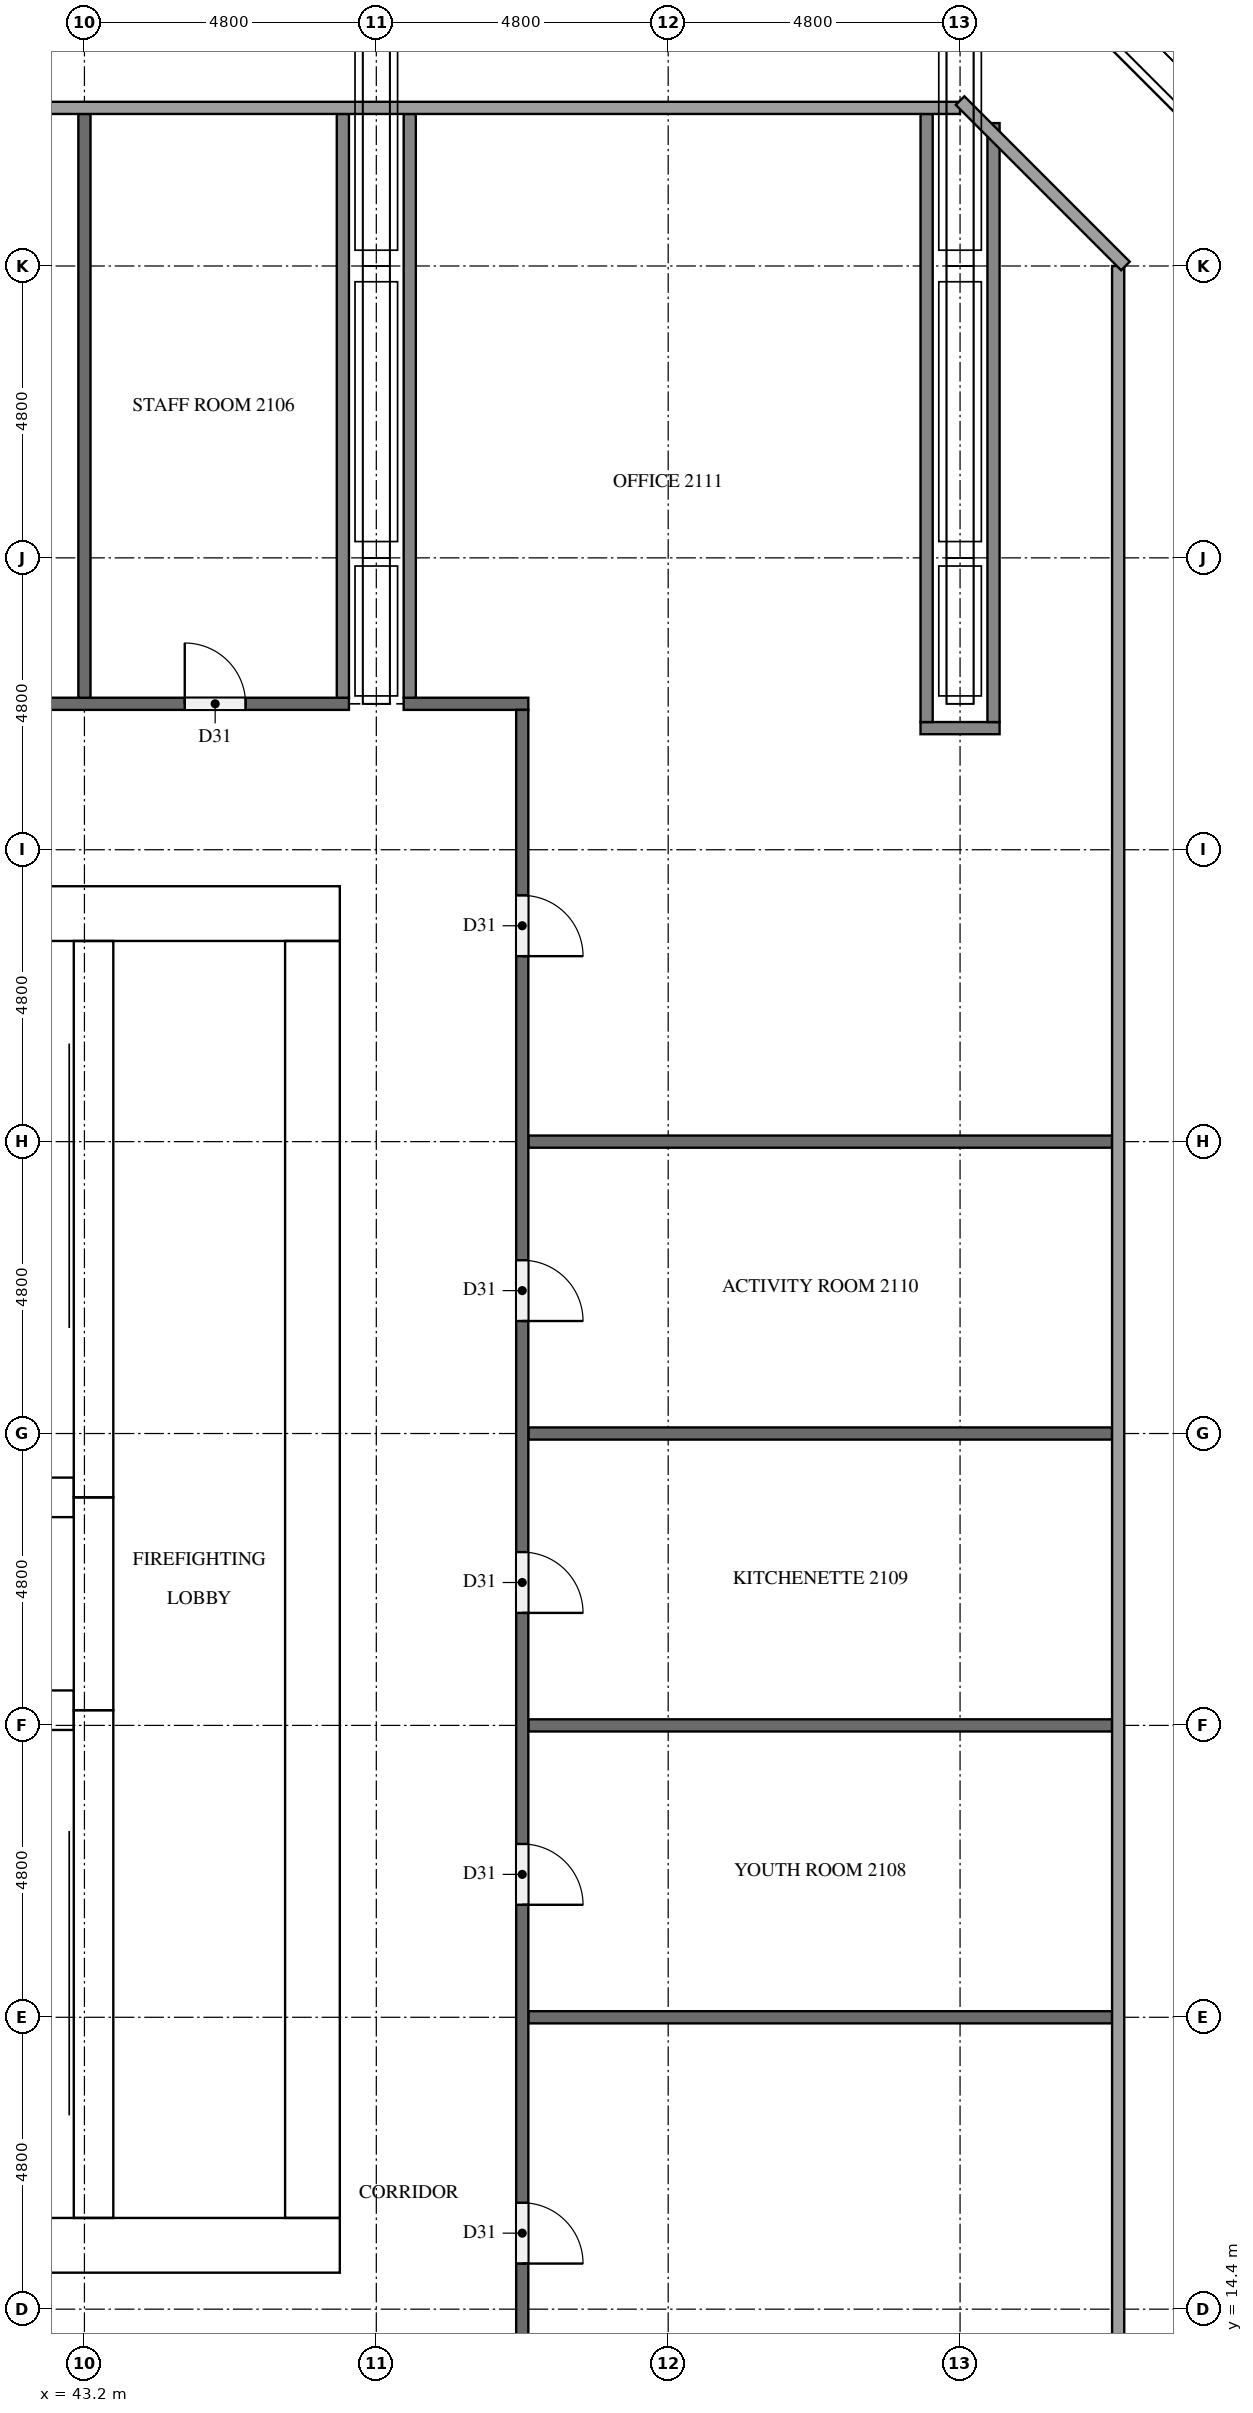
"""IFC4 building model, lengths in metres.
Left out: names, types, materials, properties, quantities, classifications, styles, units other than length and angle.
Written with IfcOpenShell. Run it as: python <this file> out.ifc"""

import sys

from ifc_helpers import new_model, si_unit, direction, frame, frame_2d, origin, place, context, subcontext, project, spatial, rectangle, extrude, element, fill, save


model = new_model("IFC4")
c1 = context("Model", 3, precision=1e-05, world=origin(), true_north=direction((0.0, 1.0)))
c2 = subcontext(c1, "Body", "Model", "MODEL_VIEW")
j1 = project(units=[si_unit("LENGTHUNIT", "METRE"), si_unit("PLANEANGLEUNIT", "RADIAN")], contexts=[c1])
p1 = place(None, origin())
s1 = spatial("IfcSite", under=j1, at=p1, CompositionType="ELEMENT")
p2 = place(p1, origin())
s2 = spatial("IfcBuilding", under=s1, at=p2, CompositionType="ELEMENT")
p3 = place(p2, frame((0.0, 0.0, 83.8)))
s3 = spatial("IfcBuildingStorey", under=s2, at=p3, CompositionType="ELEMENT", Elevation=83.8)
p4 = place(p3, frame((15.0, 15.45, 0.0), z_axis=(0.0, 0.0, 1.0), x_axis=(1.0, 0.0, 0.0)))
e1 = element("IfcWall", 1, at=p4, inside=s3, PredefinedType="SHEAR", context=c2, shape_type="SweptSolid", body=[
    extrude(rectangle(XDim=32.4, YDim=0.9, at=frame_2d((16.2, 0.0))), origin(), (0.0, 0.0, 1.0), 5.1),
])
p5 = place(p4, frame((15.3, 0.0, 0.0)))
e2 = element("IfcOpeningElement", 2, at=p5, cuts=e1, PredefinedType="OPENING", context=c2, shape_type="SweptSolid", body=[
    extrude(rectangle(XDim=1.8, YDim=2.1, at=frame_2d((0.9, 1.05))), frame((0.0, 0.46, 0.0), z_axis=(0.0, -1.0, 0.0), x_axis=(1.0, 0.0, 0.0)), (0.0, 0.0, 1.0), 0.92),
])
p6 = place(p3, frame((15.0, 37.35, 0.0), z_axis=(0.0, 0.0, 1.0), x_axis=(1.0, 0.0, 0.0)))
e3 = element("IfcWall", 3, at=p6, inside=s3, PredefinedType="SHEAR", context=c2, shape_type="SweptSolid", body=[
    extrude(rectangle(XDim=32.4, YDim=0.9, at=frame_2d((16.2, 0.0))), origin(), (0.0, 0.0, 1.0), 5.1),
])
p7 = place(p6, frame((15.3, 0.0, 0.0)))
e4 = element("IfcOpeningElement", 4, at=p7, cuts=e3, PredefinedType="OPENING", context=c2, shape_type="SweptSolid", body=[
    extrude(rectangle(XDim=1.8, YDim=2.1, at=frame_2d((0.9, 1.05))), frame((0.0, 0.46, 0.0), z_axis=(0.0, -1.0, 0.0), x_axis=(1.0, 0.0, 0.0)), (0.0, 0.0, 1.0), 0.92),
])
p8 = place(p6, frame((1.794, 0.0, 0.0)))
e5 = element("IfcOpeningElement", 5, at=p8, cuts=e3, PredefinedType="OPENING", context=c2, shape_type="SweptSolid", body=[
    extrude(rectangle(XDim=1.0, YDim=2.1, at=frame_2d((0.5, 1.05))), frame((0.0, 0.46, 0.0), z_axis=(0.0, -1.0, 0.0), x_axis=(1.0, 0.0, 0.0)), (0.0, 0.0, 1.0), 0.92),
])
p9 = place(p6, frame((5.331, 0.0, 0.0)))
e6 = element("IfcOpeningElement", 6, at=p9, cuts=e3, PredefinedType="OPENING", context=c2, shape_type="SweptSolid", body=[
    extrude(rectangle(XDim=1.0, YDim=2.1, at=frame_2d((0.5, 1.05))), frame((0.0, 0.46, 0.0), z_axis=(0.0, -1.0, 0.0), x_axis=(1.0, 0.0, 0.0)), (0.0, 0.0, 1.0), 0.92),
])
p10 = place(p3, frame((46.95, 15.9, 0.0), z_axis=(0.0, 0.0, 1.0), x_axis=(0.0, 1.0, 0.0)))
e7 = element("IfcWall", 7, at=p10, inside=s3, PredefinedType="SHEAR", context=c2, shape_type="SweptSolid", body=[
    extrude(rectangle(XDim=21.0, YDim=0.9, at=frame_2d((10.5, 0.0))), origin(), (0.0, 0.0, 1.0), 5.1),
])
p11 = place(p10, frame((10.2, 0.0, 0.0)))
e8 = element("IfcOpeningElement", 8, at=p11, cuts=e7, PredefinedType="OPENING", context=c2, shape_type="SweptSolid", body=[
    extrude(rectangle(XDim=1.2, YDim=2.1, at=frame_2d((0.6, 1.05))), frame((0.0, 0.46, 0.0), z_axis=(0.0, -1.0, 0.0), x_axis=(1.0, 0.0, 0.0)), (0.0, 0.0, 1.0), 0.92),
])
p12 = place(p3, frame((43.35, 15.9, 0.0), z_axis=(0.0, 0.0, 1.0), x_axis=(0.0, 1.0, 0.0)))
e9 = element("IfcWall", 9, at=p12, inside=s3, PredefinedType="SHEAR", context=c2, shape_type="SweptSolid", body=[
    extrude(rectangle(XDim=8.35, YDim=0.65, at=frame_2d((4.175, 0.0))), origin(), (0.0, 0.0, 1.0), 5.1),
])
p13 = place(p12, frame((0.3, 0.0, 0.0)))
e10 = element("IfcOpeningElement", 10, at=p13, cuts=e9, PredefinedType="OPENING", context=c2, shape_type="SweptSolid", body=[
    extrude(rectangle(XDim=1.2, YDim=2.1, at=frame_2d((0.6, 1.05))), frame((0.0, 0.335, 0.0), z_axis=(0.0, -1.0, 0.0), x_axis=(1.0, 0.0, 0.0)), (0.0, 0.0, 1.0), 0.67),
])
p14 = place(p3, frame((43.35, 24.25, 0.0), z_axis=(0.0, 0.0, 1.0), x_axis=(0.0, 1.0, 0.0)))
e11 = element("IfcWall", 11, at=p14, inside=s3, PredefinedType="SHEAR", context=c2, shape_type="SweptSolid", body=[
    extrude(rectangle(XDim=3.5, YDim=0.65, at=frame_2d((1.75, 0.0))), origin(), (0.0, 0.0, 1.0), 5.1),
])
p15 = place(p14, frame((1.2, 0.0, 0.0)))
e12 = element("IfcOpeningElement", 12, at=p15, cuts=e11, PredefinedType="OPENING", context=c2, shape_type="SweptSolid", body=[
    extrude(rectangle(XDim=1.1, YDim=2.1, at=frame_2d((0.55, 1.05))), frame((0.0, 0.335, 0.0), z_axis=(0.0, -1.0, 0.0), x_axis=(1.0, 0.0, 0.0)), (0.0, 0.0, 1.0), 0.67),
])
p16 = place(p3, frame((43.35, 27.75, 0.0), z_axis=(0.0, 0.0, 1.0), x_axis=(0.0, 1.0, 0.0)))
e13 = element("IfcWall", 13, at=p16, inside=s3, PredefinedType="SHEAR", context=c2, shape_type="SweptSolid", body=[
    extrude(rectangle(XDim=9.15, YDim=0.65, at=frame_2d((4.575, 0.0))), origin(), (0.0, 0.0, 1.0), 5.1),
])
p17 = place(p16, frame((7.65, 0.0, 0.0)))
e14 = element("IfcOpeningElement", 14, at=p17, cuts=e13, PredefinedType="OPENING", context=c2, shape_type="SweptSolid", body=[
    extrude(rectangle(XDim=1.2, YDim=2.1, at=frame_2d((0.6, 1.05))), frame((0.0, 0.335, 0.0), z_axis=(0.0, -1.0, 0.0), x_axis=(1.0, 0.0, 0.0)), (0.0, 0.0, 1.0), 0.67),
])
for number, where, z_axis, x_axis in (
    (15, (39.625, 24.25, 0.0), (0.0, 0.0, 1.0), (1.0, 0.0, 0.0)),
    (16, (39.625, 27.75, 0.0), (0.0, 0.0, 1.0), (1.0, 0.0, 0.0)),
):
    element("IfcWall", number, at=place(p3, frame(where, z_axis=z_axis, x_axis=x_axis)), inside=s3, PredefinedType="SHEAR", context=c2, shape_type="SweptSolid", body=[
        extrude(rectangle(XDim=3.4, YDim=0.65, at=frame_2d((1.7, 0.0))), origin(), (0.0, 0.0, 1.0), 5.1),
    ])
for number, where, z_axis, x_axis in (
    (17, (50.5, 19.2, 0.0), (0.0, 0.0, 1.0), (1.0, 0.0, 0.0)),
    (18, (50.5, 24.0, 0.0), (0.0, 0.0, 1.0), (1.0, 0.0, 0.0)),
    (19, (50.5, 28.8, 0.0), (0.0, 0.0, 1.0), (1.0, 0.0, 0.0)),
    (20, (50.5, 33.6, 0.0), (0.0, 0.0, 1.0), (1.0, 0.0, 0.0)),
):
    element("IfcWall", number, at=place(p3, frame(where, z_axis=z_axis, x_axis=x_axis)), inside=s3, PredefinedType="PARTITIONING", context=c2, shape_type="SweptSolid", body=[
        extrude(rectangle(XDim=9.6, YDim=0.2, at=frame_2d((4.8, 0.0))), origin(), (0.0, 0.0, 1.0), 5.1),
    ])
p18 = place(p3, frame((56.95, 40.4, 0.0), z_axis=(0.0, 0.0, 1.0), x_axis=(1.0, 0.0, 0.0)))
e21 = element("IfcWall", 21, at=p18, inside=s3, PredefinedType="PARTITIONING", context=c2, shape_type="SweptSolid", body=[
    extrude(rectangle(XDim=1.3, YDim=0.2, at=frame_2d((0.65, 0.0))), origin(), (0.0, 0.0, 1.0), 5.1),
])
p19 = place(p3, frame((38.85, 40.8, 0.0), z_axis=(0.0, 0.0, 1.0), x_axis=(1.0, 0.0, 0.0)))
e22 = element("IfcWall", 22, at=p19, inside=s3, PredefinedType="PARTITIONING", context=c2, shape_type="SweptSolid", body=[
    extrude(rectangle(XDim=8.7, YDim=0.2, at=frame_2d((4.35, 0.0))), origin(), (0.0, 0.0, 1.0), 5.1),
])
p20 = place(p19, frame((1.65, 0.0, 0.0)))
e23 = element("IfcOpeningElement", 23, at=p20, cuts=e22, PredefinedType="OPENING", context=c2, shape_type="SweptSolid", body=[
    extrude(rectangle(XDim=1.0, YDim=2.1, at=frame_2d((0.5, 1.05))), frame((0.0, 0.11, 0.0), z_axis=(0.0, -1.0, 0.0), x_axis=(1.0, 0.0, 0.0)), (0.0, 0.0, 1.0), 0.22),
])
p21 = place(p19, frame((6.0, 0.0, 0.0)))
e24 = element("IfcOpeningElement", 24, at=p21, cuts=e22, PredefinedType="OPENING", context=c2, shape_type="SweptSolid", body=[
    extrude(rectangle(XDim=1.0, YDim=2.1, at=frame_2d((0.5, 1.05))), frame((0.0, 0.11, 0.0), z_axis=(0.0, -1.0, 0.0), x_axis=(1.0, 0.0, 0.0)), (0.0, 0.0, 1.0), 0.22),
])
p22 = place(p3, frame((48.45, 40.8, 0.0), z_axis=(0.0, 0.0, 1.0), x_axis=(1.0, 0.0, 0.0)))
e25 = element("IfcWall", 25, at=p22, inside=s3, PredefinedType="PARTITIONING", context=c2, shape_type="SweptSolid", body=[
    extrude(rectangle(XDim=2.05, YDim=0.2, at=frame_2d((1.025, 0.0))), origin(), (0.0, 0.0, 1.0), 5.1),
])
for number, where, z_axis, x_axis in (
    (26, (43.2, 40.9, 0.0), (0.0, 0.0, 1.0), (0.0, 1.0, 0.0)),
    (27, (47.45, 40.9, 0.0), (0.0, 0.0, 1.0), (0.0, 1.0, 0.0)),
    (28, (48.55, 40.9, 0.0), (0.0, 0.0, 1.0), (0.0, 1.0, 0.0)),
):
    element("IfcWall", number, at=place(p3, frame(where, z_axis=z_axis, x_axis=x_axis)), inside=s3, PredefinedType="PARTITIONING", context=c2, shape_type="SweptSolid", body=[
        extrude(rectangle(XDim=9.6, YDim=0.2, at=frame_2d((4.8, 0.0))), origin(), (0.0, 0.0, 1.0), 5.1),
    ])
p23 = place(p3, frame((50.4, 40.7, 0.0), z_axis=(0.0, 0.0, 1.0), x_axis=(0.0, -1.0, 0.0)))
e29 = element("IfcWall", 29, at=p23, inside=s3, PredefinedType="PARTITIONING", context=c2, shape_type="SweptSolid", body=[
    extrude(rectangle(XDim=28.6, YDim=0.2, at=frame_2d((14.3, 0.0))), origin(), (0.0, 0.0, 1.0), 5.1),
])
p24 = place(p23, frame((24.55, 0.0, 0.0)))
e30 = element("IfcOpeningElement", 30, at=p24, cuts=e29, PredefinedType="OPENING", context=c2, shape_type="SweptSolid", body=[
    extrude(rectangle(XDim=1.0, YDim=2.1, at=frame_2d((0.5, 1.05))), frame((0.0, 0.11, 0.0), z_axis=(0.0, -1.0, 0.0), x_axis=(1.0, 0.0, 0.0)), (0.0, 0.0, 1.0), 0.22),
])
p25 = place(p23, frame((18.65, 0.0, 0.0)))
e31 = element("IfcOpeningElement", 31, at=p25, cuts=e29, PredefinedType="OPENING", context=c2, shape_type="SweptSolid", body=[
    extrude(rectangle(XDim=1.0, YDim=2.1, at=frame_2d((0.5, 1.05))), frame((0.0, 0.11, 0.0), z_axis=(0.0, -1.0, 0.0), x_axis=(1.0, 0.0, 0.0)), (0.0, 0.0, 1.0), 0.22),
])
p26 = place(p23, frame((13.85, 0.0, 0.0)))
e32 = element("IfcOpeningElement", 32, at=p26, cuts=e29, PredefinedType="OPENING", context=c2, shape_type="SweptSolid", body=[
    extrude(rectangle(XDim=1.0, YDim=2.1, at=frame_2d((0.5, 1.05))), frame((0.0, 0.11, 0.0), z_axis=(0.0, -1.0, 0.0), x_axis=(1.0, 0.0, 0.0)), (0.0, 0.0, 1.0), 0.22),
])
p27 = place(p23, frame((9.05, 0.0, 0.0)))
e33 = element("IfcOpeningElement", 33, at=p27, cuts=e29, PredefinedType="OPENING", context=c2, shape_type="SweptSolid", body=[
    extrude(rectangle(XDim=1.0, YDim=2.1, at=frame_2d((0.5, 1.05))), frame((0.0, 0.11, 0.0), z_axis=(0.0, -1.0, 0.0), x_axis=(1.0, 0.0, 0.0)), (0.0, 0.0, 1.0), 0.22),
])
p28 = place(p23, frame((3.05, 0.0, 0.0)))
e34 = element("IfcOpeningElement", 34, at=p28, cuts=e29, PredefinedType="OPENING", context=c2, shape_type="SweptSolid", body=[
    extrude(rectangle(XDim=1.0, YDim=2.1, at=frame_2d((0.5, 1.05))), frame((0.0, 0.11, 0.0), z_axis=(0.0, -1.0, 0.0), x_axis=(1.0, 0.0, 0.0)), (0.0, 0.0, 1.0), 0.22),
])
p29 = place(p3, frame((57.05, 40.5, 0.0), z_axis=(0.0, 0.0, 1.0), x_axis=(0.0, 1.0, 0.0)))
e35 = element("IfcWall", 35, at=p29, inside=s3, PredefinedType="PARTITIONING", context=c2, shape_type="SweptSolid", body=[
    extrude(rectangle(XDim=10.0, YDim=0.2, at=frame_2d((5.0, 0.0))), origin(), (0.0, 0.0, 1.0), 5.1),
])
p30 = place(p3, frame((58.15, 40.5, 0.0), z_axis=(0.0, 0.0, 1.0), x_axis=(0.0, 1.0, 0.0)))
e36 = element("IfcWall", 36, at=p30, inside=s3, PredefinedType="PARTITIONING", context=c2, shape_type="SweptSolid", body=[
    extrude(rectangle(XDim=9.85, YDim=0.2, at=frame_2d((4.925, 0.0))), origin(), (0.0, 0.0, 1.0), 5.1),
])
p31 = place(p15, origin())
e37 = element("IfcDoor", 37, at=p31, inside=s3, OperationType="DOUBLE_DOOR_SLIDING", PredefinedType="DOOR", context=c2, shape_type="SweptSolid", body=[
    extrude(rectangle(XDim=1.1, YDim=2.1, at=frame_2d((0.55, 1.05))), frame((0.0, 0.025, 0.0), z_axis=(0.0, -1.0, 0.0), x_axis=(1.0, 0.0, 0.0)), (0.0, 0.0, 1.0), 0.05),
])
fill(e12, e37)
p32 = place(p13, origin())
e38 = element("IfcDoor", 38, at=p32, inside=s3, OperationType="SINGLE_SWING_RIGHT", PredefinedType="DOOR", context=c2, shape_type="SweptSolid", body=[
    extrude(rectangle(XDim=1.2, YDim=2.1, at=frame_2d((0.6, 1.05))), frame((0.0, 0.025, 0.0), z_axis=(0.0, -1.0, 0.0), x_axis=(1.0, 0.0, 0.0)), (0.0, 0.0, 1.0), 0.05),
])
fill(e10, e38)
p33 = place(p17, origin())
e39 = element("IfcDoor", 39, at=p33, inside=s3, OperationType="SINGLE_SWING_LEFT", PredefinedType="DOOR", context=c2, shape_type="SweptSolid", body=[
    extrude(rectangle(XDim=1.2, YDim=2.1, at=frame_2d((0.6, 1.05))), frame((0.0, 0.025, 0.0), z_axis=(0.0, -1.0, 0.0), x_axis=(1.0, 0.0, 0.0)), (0.0, 0.0, 1.0), 0.05),
])
fill(e14, e39)
p34 = place(p11, origin())
e40 = element("IfcDoor", 40, at=p34, inside=s3, OperationType="SINGLE_SWING_LEFT", PredefinedType="DOOR", context=c2, shape_type="SweptSolid", body=[
    extrude(rectangle(XDim=1.2, YDim=2.1, at=frame_2d((0.6, 1.05))), frame((0.0, 0.025, 0.0), z_axis=(0.0, -1.0, 0.0), x_axis=(1.0, 0.0, 0.0)), (0.0, 0.0, 1.0), 0.05),
])
fill(e8, e40)
p35 = place(p21, origin())
e41 = element("IfcDoor", 41, at=p35, inside=s3, OperationType="SINGLE_SWING_LEFT", PredefinedType="DOOR", context=c2, shape_type="SweptSolid", body=[
    extrude(rectangle(XDim=1.0, YDim=2.1, at=frame_2d((0.5, 1.05))), frame((0.0, 0.025, 0.0), z_axis=(0.0, -1.0, 0.0), x_axis=(1.0, 0.0, 0.0)), (0.0, 0.0, 1.0), 0.05),
])
fill(e24, e41)
p36 = place(p24, origin())
e42 = element("IfcDoor", 42, at=p36, inside=s3, OperationType="SINGLE_SWING_RIGHT", PredefinedType="DOOR", context=c2, shape_type="SweptSolid", body=[
    extrude(rectangle(XDim=1.0, YDim=2.1, at=frame_2d((0.5, 1.05))), frame((0.0, 0.025, 0.0), z_axis=(0.0, -1.0, 0.0), x_axis=(1.0, 0.0, 0.0)), (0.0, 0.0, 1.0), 0.05),
])
fill(e30, e42)
p37 = place(p25, origin())
e43 = element("IfcDoor", 43, at=p37, inside=s3, OperationType="SINGLE_SWING_RIGHT", PredefinedType="DOOR", context=c2, shape_type="SweptSolid", body=[
    extrude(rectangle(XDim=1.0, YDim=2.1, at=frame_2d((0.5, 1.05))), frame((0.0, 0.025, 0.0), z_axis=(0.0, -1.0, 0.0), x_axis=(1.0, 0.0, 0.0)), (0.0, 0.0, 1.0), 0.05),
])
fill(e31, e43)
p38 = place(p26, origin())
e44 = element("IfcDoor", 44, at=p38, inside=s3, OperationType="SINGLE_SWING_RIGHT", PredefinedType="DOOR", context=c2, shape_type="SweptSolid", body=[
    extrude(rectangle(XDim=1.0, YDim=2.1, at=frame_2d((0.5, 1.05))), frame((0.0, 0.025, 0.0), z_axis=(0.0, -1.0, 0.0), x_axis=(1.0, 0.0, 0.0)), (0.0, 0.0, 1.0), 0.05),
])
fill(e32, e44)
p39 = place(p27, origin())
e45 = element("IfcDoor", 45, at=p39, inside=s3, OperationType="SINGLE_SWING_RIGHT", PredefinedType="DOOR", context=c2, shape_type="SweptSolid", body=[
    extrude(rectangle(XDim=1.0, YDim=2.1, at=frame_2d((0.5, 1.05))), frame((0.0, 0.025, 0.0), z_axis=(0.0, -1.0, 0.0), x_axis=(1.0, 0.0, 0.0)), (0.0, 0.0, 1.0), 0.05),
])
fill(e33, e45)
p40 = place(p28, origin())
e46 = element("IfcDoor", 46, at=p40, inside=s3, OperationType="SINGLE_SWING_RIGHT", PredefinedType="DOOR", context=c2, shape_type="SweptSolid", body=[
    extrude(rectangle(XDim=1.0, YDim=2.1, at=frame_2d((0.5, 1.05))), frame((0.0, 0.025, 0.0), z_axis=(0.0, -1.0, 0.0), x_axis=(1.0, 0.0, 0.0)), (0.0, 0.0, 1.0), 0.05),
])
fill(e34, e46)
save(model, sys.argv[1])
